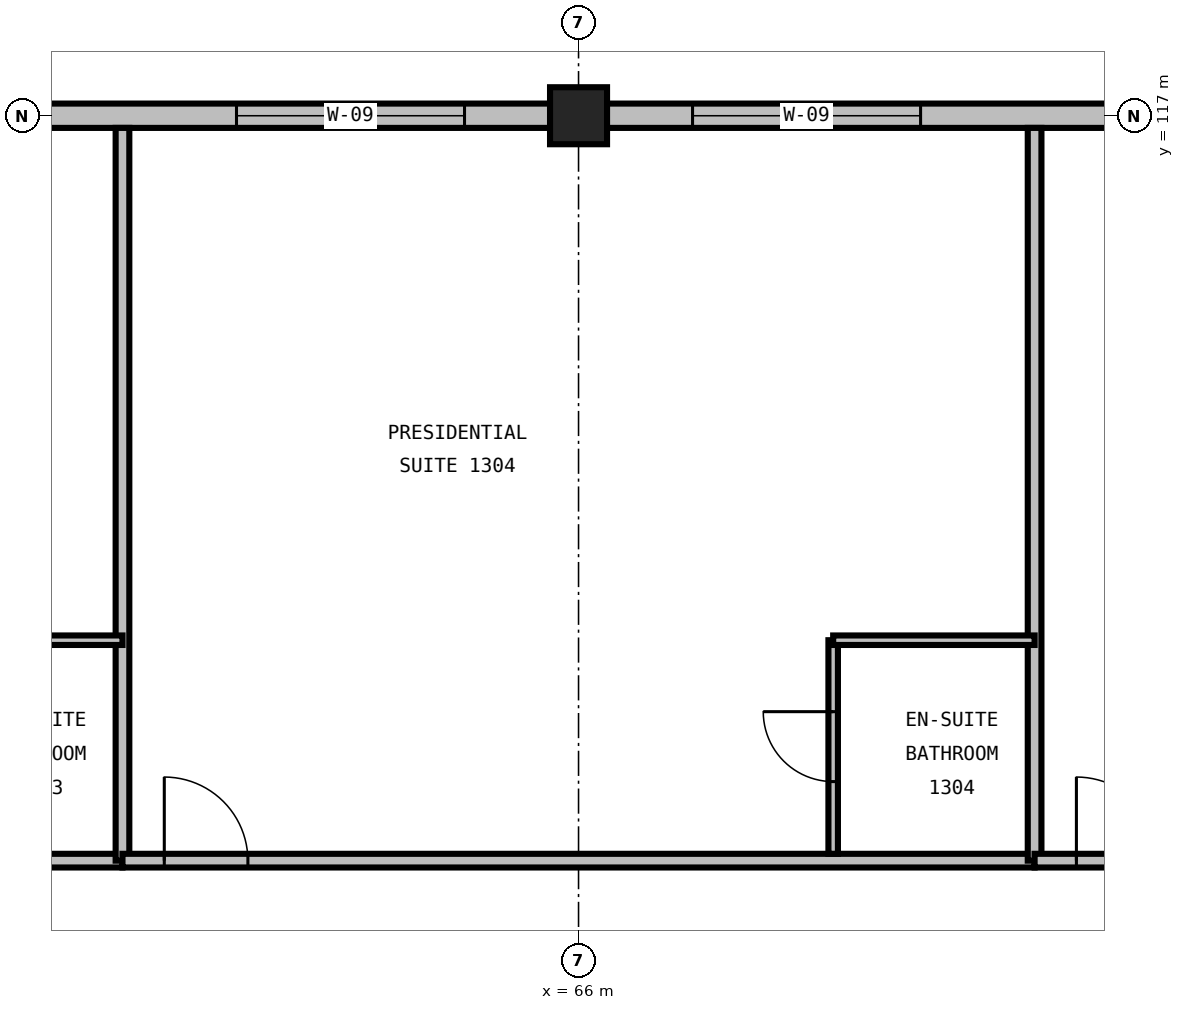
"""IFC4 building model, lengths in metres.
Left out: names, types, materials, properties, quantities, classifications, styles, units other than length and angle.
Written with IfcOpenShell. Run it as: python <this file> out.ifc"""

import sys

from ifc_helpers import new_model, si_unit, direction, frame, frame_2d, origin, origin_2d, place, context, subcontext, project, spatial, rectangle, extrude, element, fill, save


model = new_model("IFC4")
c1 = context("Model", 3, precision=1e-05, world=origin(), true_north=direction((0.0, 1.0)))
c2 = subcontext(c1, "Body", "Model", "MODEL_VIEW")
j1 = project(units=[si_unit("LENGTHUNIT", "METRE"), si_unit("PLANEANGLEUNIT", "RADIAN")], contexts=[c1])
p1 = place(None, origin())
s1 = spatial("IfcSite", under=j1, at=p1, CompositionType="ELEMENT")
p2 = place(p1, origin())
s2 = spatial("IfcBuilding", under=s1, at=p2, CompositionType="ELEMENT")
p3 = place(p2, frame((0.0, 0.0, 56.4)))
s3 = spatial("IfcBuildingStorey", under=s2, at=p3, CompositionType="ELEMENT", Elevation=56.4)
p4 = place(p3, frame((66.0, 117.0, 0.0), z_axis=(0.0, 0.0, 1.0), x_axis=(1.0, 0.0, 0.0)))
e1 = element("IfcColumn", 1, at=p4, inside=s3, PredefinedType="COLUMN", context=c2, shape_type="SweptSolid", body=[
    extrude(rectangle(XDim=0.75, YDim=0.75, at=origin_2d()), origin(), (0.0, 0.0, 1.0), 3.6),
])
p5 = place(p3, frame((66.0, 117.0, 0.0), z_axis=(0.0, 0.0, 1.0), x_axis=(-1.0, 0.0, 0.0)))
e2 = element("IfcWall", 2, at=p5, inside=s3, PredefinedType="STANDARD", context=c2, shape_type="SweptSolid", body=[
    extrude(rectangle(XDim=12.0, YDim=0.32, at=frame_2d((6.0, 0.0))), origin(), (0.0, 0.0, 1.0), 2.536),
])
p6 = place(p5, frame((1.5, 0.0, 0.7)))
e3 = element("IfcOpeningElement", 3, at=p6, cuts=e2, PredefinedType="OPENING", context=c2, shape_type="SweptSolid", body=[
    extrude(rectangle(XDim=3.0, YDim=1.71, at=frame_2d((1.5, 0.855))), frame((0.0, 0.175, 0.0), z_axis=(0.0, -1.0, 0.0), x_axis=(1.0, 0.0, 0.0)), (0.0, 0.0, 1.0), 0.35),
])
p7 = place(p5, frame((7.5, 0.0, 0.7)))
e4 = element("IfcOpeningElement", 4, at=p7, cuts=e2, PredefinedType="OPENING", context=c2, shape_type="SweptSolid", body=[
    extrude(rectangle(XDim=3.0, YDim=1.71, at=frame_2d((1.5, 0.855))), frame((0.0, 0.175, 0.0), z_axis=(0.0, -1.0, 0.0), x_axis=(1.0, 0.0, 0.0)), (0.0, 0.0, 1.0), 0.35),
])
p8 = place(p3, frame((78.0, 117.0, 0.0), z_axis=(0.0, 0.0, 1.0), x_axis=(-1.0, 0.0, 0.0)))
e5 = element("IfcWall", 5, at=p8, inside=s3, PredefinedType="STANDARD", context=c2, shape_type="SweptSolid", body=[
    extrude(rectangle(XDim=12.0, YDim=0.32, at=frame_2d((6.0, 0.0))), origin(), (0.0, 0.0, 1.0), 2.536),
])
p9 = place(p8, frame((1.5, 0.0, 0.7)))
e6 = element("IfcOpeningElement", 6, at=p9, cuts=e5, PredefinedType="OPENING", context=c2, shape_type="SweptSolid", body=[
    extrude(rectangle(XDim=3.0, YDim=1.71, at=frame_2d((1.5, 0.855))), frame((0.0, 0.175, 0.0), z_axis=(0.0, -1.0, 0.0), x_axis=(1.0, 0.0, 0.0)), (0.0, 0.0, 1.0), 0.35),
])
p10 = place(p8, frame((7.5, 0.0, 0.7)))
e7 = element("IfcOpeningElement", 7, at=p10, cuts=e5, PredefinedType="OPENING", context=c2, shape_type="SweptSolid", body=[
    extrude(rectangle(XDim=3.0, YDim=1.71, at=frame_2d((1.5, 0.855))), frame((0.0, 0.175, 0.0), z_axis=(0.0, -1.0, 0.0), x_axis=(1.0, 0.0, 0.0)), (0.0, 0.0, 1.0), 0.35),
])
p11 = place(p3, frame((48.0, 107.2, 0.0), z_axis=(0.0, 0.0, 1.0), x_axis=(1.0, 0.0, 0.0)))
e8 = element("IfcWall", 8, at=p11, inside=s3, PredefinedType="PARTITIONING", context=c2, shape_type="SweptSolid", body=[
    extrude(rectangle(XDim=12.0, YDim=0.18, at=frame_2d((6.0, 0.0))), origin(), (0.0, 0.0, 1.0), 3.29),
])
p12 = place(p11, frame((0.55, 0.0, 0.0)))
e9 = element("IfcOpeningElement", 9, at=p12, cuts=e8, PredefinedType="OPENING", context=c2, shape_type="SweptSolid", body=[
    extrude(rectangle(XDim=1.1, YDim=2.2, at=frame_2d((0.55, 1.1))), frame((0.0, 0.105, 0.0), z_axis=(0.0, -1.0, 0.0), x_axis=(1.0, 0.0, 0.0)), (0.0, 0.0, 1.0), 0.21),
])
p13 = place(p3, frame((60.0, 107.2, 0.0), z_axis=(0.0, 0.0, 1.0), x_axis=(0.0, 1.0, 0.0)))
e10 = element("IfcWall", 10, at=p13, inside=s3, PredefinedType="PARTITIONING", context=c2, shape_type="SweptSolid", body=[
    extrude(rectangle(XDim=9.64, YDim=0.18, at=frame_2d((4.82, 0.0))), origin(), (0.0, 0.0, 1.0), 3.29),
])
p14 = place(p3, frame((57.35, 110.1, 0.0), z_axis=(0.0, 0.0, 1.0), x_axis=(1.0, 0.0, 0.0)))
e11 = element("IfcWall", 11, at=p14, inside=s3, PredefinedType="PARTITIONING", context=c2, shape_type="SweptSolid", body=[
    extrude(rectangle(XDim=2.65, YDim=0.125, at=frame_2d((1.325, 0.0))), origin(), (0.0, 0.0, 1.0), 3.29),
])
p15 = place(p3, frame((60.0, 107.2, 0.0), z_axis=(0.0, 0.0, 1.0), x_axis=(1.0, 0.0, 0.0)))
e12 = element("IfcWall", 12, at=p15, inside=s3, PredefinedType="PARTITIONING", context=c2, shape_type="SweptSolid", body=[
    extrude(rectangle(XDim=12.0, YDim=0.18, at=frame_2d((6.0, 0.0))), origin(), (0.0, 0.0, 1.0), 3.29),
])
p16 = place(p15, frame((0.55, 0.0, 0.0)))
e13 = element("IfcOpeningElement", 13, at=p16, cuts=e12, PredefinedType="OPENING", context=c2, shape_type="SweptSolid", body=[
    extrude(rectangle(XDim=1.1, YDim=2.2, at=frame_2d((0.55, 1.1))), frame((0.0, 0.105, 0.0), z_axis=(0.0, -1.0, 0.0), x_axis=(1.0, 0.0, 0.0)), (0.0, 0.0, 1.0), 0.21),
])
p17 = place(p3, frame((72.0, 107.2, 0.0), z_axis=(0.0, 0.0, 1.0), x_axis=(0.0, 1.0, 0.0)))
e14 = element("IfcWall", 14, at=p17, inside=s3, PredefinedType="PARTITIONING", context=c2, shape_type="SweptSolid", body=[
    extrude(rectangle(XDim=9.64, YDim=0.18, at=frame_2d((4.82, 0.0))), origin(), (0.0, 0.0, 1.0), 3.29),
])
p18 = place(p3, frame((69.35, 107.29, 0.0), z_axis=(0.0, 0.0, 1.0), x_axis=(0.0, 1.0, 0.0)))
e15 = element("IfcWall", 15, at=p18, inside=s3, PredefinedType="PARTITIONING", context=c2, shape_type="SweptSolid", body=[
    extrude(rectangle(XDim=2.81, YDim=0.125, at=frame_2d((1.405, 0.0))), origin(), (0.0, 0.0, 1.0), 3.29),
])
p19 = place(p18, frame((0.95, 0.0, 0.0)))
e16 = element("IfcOpeningElement", 16, at=p19, cuts=e15, PredefinedType="OPENING", context=c2, shape_type="SweptSolid", body=[
    extrude(rectangle(XDim=0.92, YDim=2.1, at=frame_2d((0.46, 1.05))), frame((0.0, 0.077, 0.0), z_axis=(0.0, -1.0, 0.0), x_axis=(1.0, 0.0, 0.0)), (0.0, 0.0, 1.0), 0.155),
])
p20 = place(p3, frame((69.35, 110.1, 0.0), z_axis=(0.0, 0.0, 1.0), x_axis=(1.0, 0.0, 0.0)))
e17 = element("IfcWall", 17, at=p20, inside=s3, PredefinedType="PARTITIONING", context=c2, shape_type="SweptSolid", body=[
    extrude(rectangle(XDim=2.65, YDim=0.125, at=frame_2d((1.325, 0.0))), origin(), (0.0, 0.0, 1.0), 3.29),
])
p21 = place(p3, frame((72.0, 107.2, 0.0), z_axis=(0.0, 0.0, 1.0), x_axis=(1.0, 0.0, 0.0)))
e18 = element("IfcWall", 18, at=p21, inside=s3, PredefinedType="PARTITIONING", context=c2, shape_type="SweptSolid", body=[
    extrude(rectangle(XDim=11.915, YDim=0.18, at=frame_2d((5.957, 0.0))), origin(), (0.0, 0.0, 1.0), 3.29),
])
p22 = place(p21, frame((0.55, 0.0, 0.0)))
e19 = element("IfcOpeningElement", 19, at=p22, cuts=e18, PredefinedType="OPENING", context=c2, shape_type="SweptSolid", body=[
    extrude(rectangle(XDim=1.1, YDim=2.2, at=frame_2d((0.55, 1.1))), frame((0.0, 0.105, 0.0), z_axis=(0.0, -1.0, 0.0), x_axis=(1.0, 0.0, 0.0)), (0.0, 0.0, 1.0), 0.21),
])
p23 = place(p6, origin())
e20 = element("IfcWindow", 20, at=p23, inside=s3, PartitioningType="TRIPLE_PANEL_VERTICAL", PredefinedType="WINDOW", context=c2, shape_type="SweptSolid", body=[
    extrude(rectangle(XDim=3.0, YDim=1.71, at=frame_2d((1.5, 0.855))), frame((0.0, 0.03, 0.0), z_axis=(0.0, -1.0, 0.0), x_axis=(1.0, 0.0, 0.0)), (0.0, 0.0, 1.0), 0.06),
])
fill(e3, e20)
p24 = place(p10, origin())
e21 = element("IfcWindow", 21, at=p24, inside=s3, PartitioningType="TRIPLE_PANEL_VERTICAL", PredefinedType="WINDOW", context=c2, shape_type="SweptSolid", body=[
    extrude(rectangle(XDim=3.0, YDim=1.71, at=frame_2d((1.5, 0.855))), frame((0.0, 0.03, 0.0), z_axis=(0.0, -1.0, 0.0), x_axis=(1.0, 0.0, 0.0)), (0.0, 0.0, 1.0), 0.06),
])
fill(e7, e21)
p25 = place(p16, origin())
e22 = element("IfcDoor", 22, at=p25, inside=s3, OperationType="SINGLE_SWING_LEFT", PredefinedType="DOOR", context=c2, shape_type="SweptSolid", body=[
    extrude(rectangle(XDim=1.1, YDim=2.2, at=frame_2d((0.55, 1.1))), frame((0.0, 0.025, 0.0), z_axis=(0.0, -1.0, 0.0), x_axis=(1.0, 0.0, 0.0)), (0.0, 0.0, 1.0), 0.05),
])
fill(e13, e22)
p26 = place(p19, origin())
e23 = element("IfcDoor", 23, at=p26, inside=s3, OperationType="SINGLE_SWING_RIGHT", PredefinedType="DOOR", context=c2, shape_type="SweptSolid", body=[
    extrude(rectangle(XDim=0.92, YDim=2.1, at=frame_2d((0.46, 1.05))), frame((0.0, 0.025, 0.0), z_axis=(0.0, -1.0, 0.0), x_axis=(1.0, 0.0, 0.0)), (0.0, 0.0, 1.0), 0.05),
])
fill(e16, e23)
p27 = place(p22, origin())
e24 = element("IfcDoor", 24, at=p27, inside=s3, OperationType="SINGLE_SWING_LEFT", PredefinedType="DOOR", context=c2, shape_type="SweptSolid", body=[
    extrude(rectangle(XDim=1.1, YDim=2.2, at=frame_2d((0.55, 1.1))), frame((0.0, 0.025, 0.0), z_axis=(0.0, -1.0, 0.0), x_axis=(1.0, 0.0, 0.0)), (0.0, 0.0, 1.0), 0.05),
])
fill(e19, e24)
save(model, sys.argv[1])
